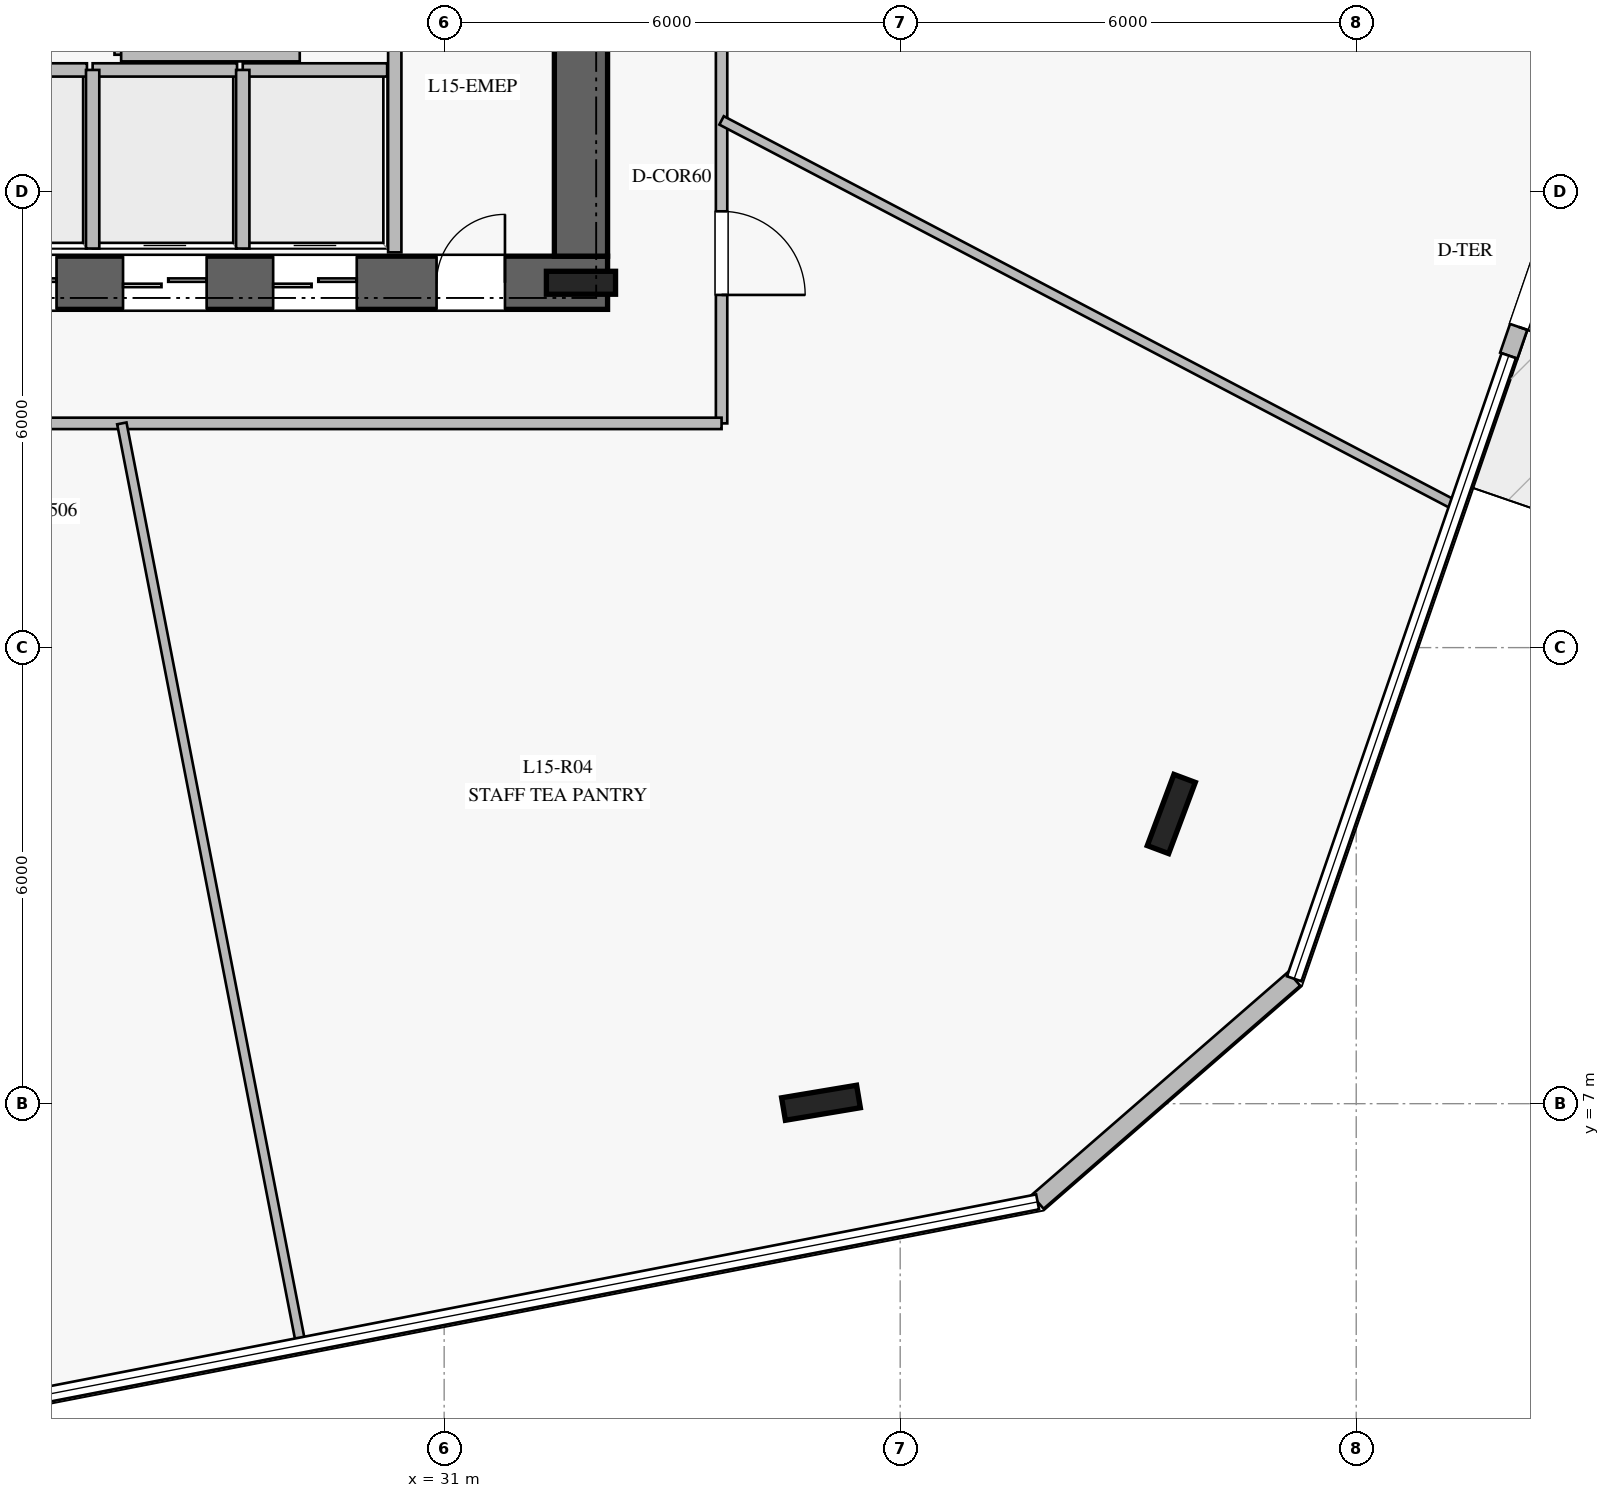
"""IFC4 building model, lengths in metres.
Left out: names, types, materials, properties, quantities, classifications, styles, units other than length and angle.
Written with IfcOpenShell. Run it as: python <this file> out.ifc"""

import sys

from ifc_helpers import new_model, si_unit, direction, frame, frame_2d, origin, origin_2d, place, context, subcontext, project, spatial, rectangle, i_section, extrude, element, fill, save


model = new_model("IFC4")
c1 = context("Model", 3, precision=1e-05, world=origin(), true_north=direction((0.0, 1.0)))
c2 = subcontext(c1, "Body", "Model", "MODEL_VIEW")
j1 = project(units=[si_unit("LENGTHUNIT", "METRE"), si_unit("PLANEANGLEUNIT", "RADIAN")], contexts=[c1])
p1 = place(None, origin())
s1 = spatial("IfcSite", under=j1, at=p1, CompositionType="ELEMENT")
p2 = place(p1, origin())
s2 = spatial("IfcBuilding", under=s1, at=p2, CompositionType="ELEMENT")
p3 = place(p2, frame((0.0, 0.0, 64.0)))
s3 = spatial("IfcBuildingStorey", under=s2, at=p3, CompositionType="ELEMENT", Elevation=64.0)
p4 = place(p3, frame((16.85, 17.8, 0.0), z_axis=(0.0, 0.0, 1.0), x_axis=(1.0, 0.0, 0.0)))
e1 = element("IfcWall", 1, at=p4, inside=s3, PredefinedType="SHEAR", context=c2, shape_type="SweptSolid", body=[
    extrude(rectangle(XDim=16.3, YDim=0.7, at=frame_2d((8.15, 0.0))), origin(), (0.0, 0.0, 1.0), 3.76),
])
p5 = place(p4, frame((5.1, 0.0, 0.0)))
e2 = element("IfcOpeningElement", 2, at=p5, cuts=e1, PredefinedType="OPENING", context=c2, shape_type="SweptSolid", body=[
    extrude(rectangle(XDim=1.2, YDim=2.25, at=frame_2d((0.6, 1.125))), frame((0.0, 0.36, 0.0), z_axis=(0.0, -1.0, 0.0), x_axis=(1.0, 0.0, 0.0)), (0.0, 0.0, 1.0), 0.72),
])
p6 = place(p4, frame((14.05, 0.0, 0.0)))
e3 = element("IfcOpeningElement", 3, at=p6, cuts=e1, PredefinedType="OPENING", context=c2, shape_type="SweptSolid", body=[
    extrude(rectangle(XDim=0.9, YDim=2.1, at=frame_2d((0.45, 1.05))), frame((0.0, 0.36, 0.0), z_axis=(0.0, -1.0, 0.0), x_axis=(1.0, 0.0, 0.0)), (0.0, 0.0, 1.0), 0.72),
])
p7 = place(p4, frame((7.95, 0.0, 0.0)))
e4 = element("IfcOpeningElement", 4, at=p7, cuts=e1, PredefinedType="OPENING", context=c2, shape_type="SweptSolid", body=[
    extrude(rectangle(XDim=1.1, YDim=2.2, at=frame_2d((0.55, 1.1))), frame((0.0, 0.36, 0.0), z_axis=(0.0, -1.0, 0.0), x_axis=(1.0, 0.0, 0.0)), (0.0, 0.0, 1.0), 0.72),
])
p8 = place(p4, frame((9.925, 0.0, 0.0)))
e5 = element("IfcOpeningElement", 5, at=p8, cuts=e1, PredefinedType="OPENING", context=c2, shape_type="SweptSolid", body=[
    extrude(rectangle(XDim=1.1, YDim=2.2, at=frame_2d((0.55, 1.1))), frame((0.0, 0.36, 0.0), z_axis=(0.0, -1.0, 0.0), x_axis=(1.0, 0.0, 0.0)), (0.0, 0.0, 1.0), 0.72),
])
p9 = place(p4, frame((11.9, 0.0, 0.0)))
e6 = element("IfcOpeningElement", 6, at=p9, cuts=e1, PredefinedType="OPENING", context=c2, shape_type="SweptSolid", body=[
    extrude(rectangle(XDim=1.1, YDim=2.2, at=frame_2d((0.55, 1.1))), frame((0.0, 0.36, 0.0), z_axis=(0.0, -1.0, 0.0), x_axis=(1.0, 0.0, 0.0)), (0.0, 0.0, 1.0), 0.72),
])
p10 = place(p3, frame((32.8, 18.15, 0.0), z_axis=(0.0, 0.0, 1.0), x_axis=(0.0, 1.0, 0.0)))
e7 = element("IfcWall", 7, at=p10, inside=s3, PredefinedType="SHEAR", context=c2, shape_type="SweptSolid", body=[
    extrude(rectangle(XDim=13.7, YDim=0.7, at=frame_2d((6.85, 0.0))), origin(), (0.0, 0.0, 1.0), 3.76),
])
p11 = place(p3, frame((32.8, 17.8, 0.0), z_axis=(0.0, 0.0, 1.0), x_axis=(1.0, 0.0, 0.0)))
e8 = element("IfcColumn", 8, at=p11, inside=s3, PredefinedType="COLUMN", context=c2, shape_type="SweptSolid", body=[
    extrude(i_section(OverallWidth=0.302, OverallDepth=0.91, WebThickness=0.021, FlangeThickness=0.04, at=origin_2d()), origin(), (0.0, 0.0, 1.0), 4.0),
])
for number, where, z_axis, x_axis in (
    (9, (35.958, 7.012, 0.0), (0.0, 0.0, 1.0), (0.986, 0.165, 0.0)),
    (10, (40.567, 10.811, 0.0), (0.0, 0.0, 1.0), (0.35, 0.937, 0.0)),
):
    element("IfcColumn", number, at=place(p3, frame(where, z_axis=z_axis, x_axis=x_axis)), inside=s3, PredefinedType="COLUMN", context=c2, shape_type="SweptSolid", body=[
        extrude(i_section(OverallWidth=0.3, OverallDepth=1.0, WebThickness=0.019, FlangeThickness=0.036, at=origin_2d()), origin(), (0.0, 0.0, 1.0), 4.0),
    ])
p12 = place(p3, frame((38.808, 5.708, 0.0), z_axis=(0.0, 0.0, 1.0), x_axis=(0.75466896477, 0.656105748804, 0.0)))
e11 = element("IfcWall", 11, at=p12, inside=s3, PredefinedType="STANDARD", context=c2, shape_type="SweptSolid", body=[
    extrude(rectangle(XDim=4.473, YDim=0.24, at=frame_2d((2.237, 0.0))), origin(), (0.0, 0.0, 1.0), 3.76),
])
p13 = place(p3, frame((45.007, 16.841, 0.0), z_axis=(0.0, 0.0, 1.0), x_axis=(0.32533555883, 0.945598632698, 0.0)))
e12 = element("IfcWall", 12, at=p13, inside=s3, PredefinedType="STANDARD", context=c2, shape_type="SweptSolid", body=[
    extrude(rectangle(XDim=2.401, YDim=0.24, at=frame_2d((1.2, 0.0))), origin(), (0.0, 0.0, 1.0), 3.76),
])
p14 = place(p13, frame((0.4, 0.0, 0.0)))
e13 = element("IfcOpeningElement", 13, at=p14, cuts=e12, PredefinedType="OPENING", context=c2, shape_type="SweptSolid", body=[
    extrude(rectangle(XDim=1.6, YDim=2.25, at=frame_2d((0.8, 1.125))), frame((0.0, 0.13, 0.0), z_axis=(0.0, -1.0, 0.0), x_axis=(1.0, 0.0, 0.0)), (0.0, 0.0, 1.0), 0.26),
])
p15 = place(p3, frame((30.35, 18.2, 0.0), z_axis=(0.0, 0.0, 1.0), x_axis=(0.0, 1.0, 0.0)))
e14 = element("IfcWall", 14, at=p15, inside=s3, PredefinedType="PARTITIONING", context=c2, shape_type="SweptSolid", body=[
    extrude(rectangle(XDim=3.48, YDim=0.175, at=frame_2d((1.74, 0.0))), origin(), (0.0, 0.0, 1.0), 3.76),
])
p16 = place(p3, frame((24.4, 20.6, 0.0), z_axis=(0.0, 0.0, 1.0), x_axis=(1.0, 0.0, 0.0)))
e15 = element("IfcWall", 15, at=p16, inside=s3, PredefinedType="PARTITIONING", context=c2, shape_type="SweptSolid", body=[
    extrude(rectangle(XDim=1.9, YDim=0.175, at=frame_2d((0.95, 0.0))), origin(), (0.0, 0.0, 1.0), 3.76),
])
p17 = place(p3, frame((26.375, 20.6, 0.0), z_axis=(0.0, 0.0, 1.0), x_axis=(1.0, 0.0, 0.0)))
e16 = element("IfcWall", 16, at=p17, inside=s3, PredefinedType="PARTITIONING", context=c2, shape_type="SweptSolid", body=[
    extrude(rectangle(XDim=1.9, YDim=0.175, at=frame_2d((0.95, 0.0))), origin(), (0.0, 0.0, 1.0), 3.76),
])
p18 = place(p3, frame((26.375, 18.25, 0.0), z_axis=(0.0, 0.0, 1.0), x_axis=(0.0, 1.0, 0.0)))
e17 = element("IfcWall", 17, at=p18, inside=s3, PredefinedType="PARTITIONING", context=c2, shape_type="SweptSolid", body=[
    extrude(rectangle(XDim=2.35, YDim=0.175, at=frame_2d((1.175, 0.0))), origin(), (0.0, 0.0, 1.0), 3.76),
])
p19 = place(p3, frame((28.35, 20.6, 0.0), z_axis=(0.0, 0.0, 1.0), x_axis=(1.0, 0.0, 0.0)))
e18 = element("IfcWall", 18, at=p19, inside=s3, PredefinedType="PARTITIONING", context=c2, shape_type="SweptSolid", body=[
    extrude(rectangle(XDim=1.9, YDim=0.175, at=frame_2d((0.95, 0.0))), origin(), (0.0, 0.0, 1.0), 3.76),
])
p20 = place(p3, frame((28.35, 18.25, 0.0), z_axis=(0.0, 0.0, 1.0), x_axis=(0.0, 1.0, 0.0)))
e19 = element("IfcWall", 19, at=p20, inside=s3, PredefinedType="PARTITIONING", context=c2, shape_type="SweptSolid", body=[
    extrude(rectangle(XDim=2.35, YDim=0.175, at=frame_2d((1.175, 0.0))), origin(), (0.0, 0.0, 1.0), 3.76),
])
p21 = place(p3, frame((26.75, 20.8, 0.0), z_axis=(0.0, 0.0, 1.0), x_axis=(0.0, 1.0, 0.0)))
e20 = element("IfcWall", 20, at=p21, inside=s3, PredefinedType="PARTITIONING", context=c2, shape_type="SweptSolid", body=[
    extrude(rectangle(XDim=1.9, YDim=0.175, at=frame_2d((0.95, 0.0))), origin(), (0.0, 0.0, 1.0), 3.76),
])
p22 = place(p3, frame((26.75, 20.8, 0.0), z_axis=(0.0, 0.0, 1.0), x_axis=(1.0, 0.0, 0.0)))
e21 = element("IfcWall", 21, at=p22, inside=s3, PredefinedType="PARTITIONING", context=c2, shape_type="SweptSolid", body=[
    extrude(rectangle(XDim=2.35, YDim=0.175, at=frame_2d((1.175, 0.0))), origin(), (0.0, 0.0, 1.0), 3.76),
])
p23 = place(p3, frame((34.65, 34.05, 0.0), z_axis=(0.0, 0.0, 1.0), x_axis=(0.0, -1.0, 0.0)))
e22 = element("IfcWall", 22, at=p23, inside=s3, PredefinedType="PARTITIONING", context=c2, shape_type="SweptSolid", body=[
    extrude(rectangle(XDim=18.1, YDim=0.15, at=frame_2d((9.05, 0.0))), origin(), (0.0, 0.0, 1.0), 3.21),
])
p24 = place(p23, frame((15.31, 0.0, 0.0)))
e23 = element("IfcOpeningElement", 23, at=p24, cuts=e22, PredefinedType="OPENING", context=c2, shape_type="SweptSolid", body=[
    extrude(rectangle(XDim=1.1, YDim=2.2, at=frame_2d((0.55, 1.1))), frame((0.0, 0.085, 0.0), z_axis=(0.0, -1.0, 0.0), x_axis=(1.0, 0.0, 0.0)), (0.0, 0.0, 1.0), 0.17),
])
p25 = place(p23, frame((9.532, 0.0, 0.0)))
e24 = element("IfcOpeningElement", 24, at=p25, cuts=e22, PredefinedType="OPENING", context=c2, shape_type="SweptSolid", body=[
    extrude(rectangle(XDim=1.1, YDim=2.2, at=frame_2d((0.55, 1.1))), frame((0.0, 0.085, 0.0), z_axis=(0.0, -1.0, 0.0), x_axis=(1.0, 0.0, 0.0)), (0.0, 0.0, 1.0), 0.17),
])
p26 = place(p3, frame((34.65, 15.95, 0.0), z_axis=(0.0, 0.0, 1.0), x_axis=(-1.0, 0.0, 0.0)))
e25 = element("IfcWall", 25, at=p26, inside=s3, PredefinedType="PARTITIONING", context=c2, shape_type="SweptSolid", body=[
    extrude(rectangle(XDim=19.3, YDim=0.15, at=frame_2d((9.65, 0.0))), origin(), (0.0, 0.0, 1.0), 3.21),
])
p27 = place(p26, frame((12.856, 0.0, 0.0)))
e26 = element("IfcOpeningElement", 26, at=p27, cuts=e25, PredefinedType="OPENING", context=c2, shape_type="SweptSolid", body=[
    extrude(rectangle(XDim=1.1, YDim=2.2, at=frame_2d((0.55, 1.1))), frame((0.0, 0.085, 0.0), z_axis=(0.0, -1.0, 0.0), x_axis=(1.0, 0.0, 0.0)), (0.0, 0.0, 1.0), 0.17),
])
p28 = place(p3, frame((26.759, 15.95, 0.0), z_axis=(0.0, 0.0, 1.0), x_axis=(0.190830458369, -0.981623011221, 0.0)))
e27 = element("IfcWall", 27, at=p28, inside=s3, PredefinedType="PARTITIONING", context=c2, shape_type="SweptSolid", body=[
    extrude(rectangle(XDim=12.336, YDim=0.125, at=frame_2d((6.168, 0.0))), origin(), (0.0, 0.0, 1.0), 3.02),
])
p29 = place(p3, frame((34.65, 19.936, 0.0), z_axis=(0.0, 0.0, 1.0), x_axis=(0.885490007515, -0.464658419262, 0.0)))
e28 = element("IfcWall", 28, at=p29, inside=s3, PredefinedType="PARTITIONING", context=c2, shape_type="SweptSolid", body=[
    extrude(rectangle(XDim=10.907, YDim=0.125, at=frame_2d((5.454, 0.0))), origin(), (0.0, 0.0, 1.0), 3.05),
])
p30 = place(p14, frame((1.6, 0.0, 0.0), z_axis=(0.0, 0.0, 1.0), x_axis=(-1.0, 0.0, 0.0)))
e29 = element("IfcDoor", 29, at=p30, inside=s3, OperationType="DOUBLE_DOOR_SINGLE_SWING", PredefinedType="DOOR", context=c2, shape_type="SweptSolid", body=[
    extrude(rectangle(XDim=1.6, YDim=2.25, at=frame_2d((0.8, 1.125))), frame((0.0, 0.025, 0.0), z_axis=(0.0, -1.0, 0.0), x_axis=(1.0, 0.0, 0.0)), (0.0, 0.0, 1.0), 0.05),
])
fill(e13, e29)
p31 = place(p6, origin())
e30 = element("IfcDoor", 30, at=p31, inside=s3, OperationType="SINGLE_SWING_RIGHT", PredefinedType="DOOR", context=c2, shape_type="SweptSolid", body=[
    extrude(rectangle(XDim=0.9, YDim=2.1, at=frame_2d((0.45, 1.05))), frame((0.0, 0.025, 0.0), z_axis=(0.0, -1.0, 0.0), x_axis=(1.0, 0.0, 0.0)), (0.0, 0.0, 1.0), 0.05),
])
fill(e3, e30)
p32 = place(p7, origin())
e31 = element("IfcDoor", 31, at=p32, inside=s3, OperationType="DOUBLE_DOOR_SLIDING", PredefinedType="DOOR", context=c2, shape_type="SweptSolid", body=[
    extrude(rectangle(XDim=1.1, YDim=2.2, at=frame_2d((0.55, 1.1))), frame((0.0, 0.025, 0.0), z_axis=(0.0, -1.0, 0.0), x_axis=(1.0, 0.0, 0.0)), (0.0, 0.0, 1.0), 0.05),
])
fill(e4, e31)
p33 = place(p8, origin())
e32 = element("IfcDoor", 32, at=p33, inside=s3, OperationType="DOUBLE_DOOR_SLIDING", PredefinedType="DOOR", context=c2, shape_type="SweptSolid", body=[
    extrude(rectangle(XDim=1.1, YDim=2.2, at=frame_2d((0.55, 1.1))), frame((0.0, 0.025, 0.0), z_axis=(0.0, -1.0, 0.0), x_axis=(1.0, 0.0, 0.0)), (0.0, 0.0, 1.0), 0.05),
])
fill(e5, e32)
p34 = place(p9, origin())
e33 = element("IfcDoor", 33, at=p34, inside=s3, OperationType="DOUBLE_DOOR_SLIDING", PredefinedType="DOOR", context=c2, shape_type="SweptSolid", body=[
    extrude(rectangle(XDim=1.1, YDim=2.2, at=frame_2d((0.55, 1.1))), frame((0.0, 0.025, 0.0), z_axis=(0.0, -1.0, 0.0), x_axis=(1.0, 0.0, 0.0)), (0.0, 0.0, 1.0), 0.05),
])
fill(e6, e33)
p35 = place(p24, origin())
e34 = element("IfcDoor", 34, at=p35, inside=s3, OperationType="SINGLE_SWING_RIGHT", PredefinedType="DOOR", context=c2, shape_type="SweptSolid", body=[
    extrude(rectangle(XDim=1.1, YDim=2.2, at=frame_2d((0.55, 1.1))), frame((0.0, 0.025, 0.0), z_axis=(0.0, -1.0, 0.0), x_axis=(1.0, 0.0, 0.0)), (0.0, 0.0, 1.0), 0.05),
])
fill(e23, e34)
save(model, sys.argv[1])
